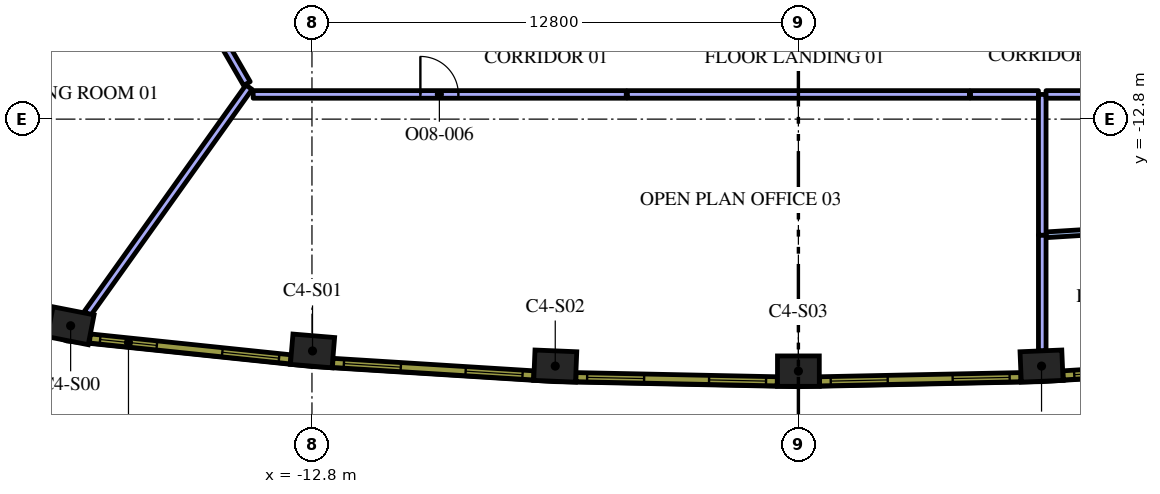
"""IFC4 building model, lengths in metres.
Left out: names, types, materials, properties, quantities, classifications, styles, units other than length and angle.
Written with IfcOpenShell. Run it as: python <this file> out.ifc"""

import sys

from ifc_helpers import new_model, si_unit, direction, frame, frame_2d, origin, origin_2d, place, context, subcontext, project, spatial, rectangle, extrude, element, fill, save


model = new_model("IFC4")
c1 = context("Model", 3, precision=1e-05, world=origin(), true_north=direction((0.0, 1.0)))
c2 = subcontext(c1, "Body", "Model", "MODEL_VIEW")
j1 = project(units=[si_unit("LENGTHUNIT", "METRE"), si_unit("PLANEANGLEUNIT", "RADIAN")], contexts=[c1])
p1 = place(None, origin())
s1 = spatial("IfcSite", under=j1, at=p1, CompositionType="ELEMENT")
p2 = place(p1, origin())
s2 = spatial("IfcBuilding", under=s1, at=p2, CompositionType="ELEMENT")
p3 = place(p2, frame((0.0, 0.0, 231.0)))
s3 = spatial("IfcBuildingStorey", under=s2, at=p3, CompositionType="ELEMENT", Elevation=231.0)
for number, where, z_axis, x_axis in (
    (1, (-19.15, -18.237, 0.0), (0.0, 0.0, 1.0), (0.981, -0.192, 0.0)),
    (2, (-12.785, -18.9, 0.0), (0.0, 0.0, 1.0), (0.997, -0.083, 0.0)),
    (3, (-6.398, -19.298, 0.0), (0.0, 0.0, 1.0), (0.999, -0.041, 0.0)),
    (4, (0.0, -19.431, 0.0), (0.0, 0.0, 1.0), (1.0, 0.0, 0.0)),
    (5, (6.398, -19.298, 0.0), (0.0, 0.0, 1.0), (0.999, 0.041, 0.0)),
):
    element("IfcColumn", number, at=place(p3, frame(where, z_axis=z_axis, x_axis=x_axis)), inside=s3, PredefinedType="COLUMN", context=c2, shape_type="SweptSolid", body=[
        extrude(rectangle(XDim=1.1, YDim=0.8, at=origin_2d()), origin(), (0.0, 0.0, 1.0), 4.2),
    ])
p4 = place(p3, frame((-14.457, -11.96, 0.0), z_axis=(0.0, 0.0, 1.0), x_axis=(-0.581023578026, -0.813886725397, 0.0)))
e6 = element("IfcWall", 6, at=p4, inside=s3, PredefinedType="PARTITIONING", context=c2, shape_type="SweptSolid", body=[
    extrude(rectangle(XDim=7.318, YDim=0.2, at=frame_2d((3.659, 0.0))), origin(), (0.0, 0.0, 1.0), 3.45),
])
p5 = place(p3, frame((-17.531, -6.635, 0.0), z_axis=(0.0, 0.0, 1.0), x_axis=(0.500009459589, -0.866019942219, 0.0)))
e7 = element("IfcWall", 7, at=p5, inside=s3, PredefinedType="PARTITIONING", context=c2, shape_type="SweptSolid", body=[
    extrude(rectangle(XDim=6.038, YDim=0.2, at=frame_2d((3.019, 0.0))), origin(), (0.0, 0.0, 1.0), 3.45),
])
p6 = place(p5, frame((2.5, 0.0, 0.0)))
e8 = element("IfcOpeningElement", 8, at=p6, cuts=e7, PredefinedType="OPENING", context=c2, shape_type="SweptSolid", body=[
    extrude(rectangle(XDim=1.0, YDim=2.1, at=frame_2d((0.5, 1.05))), frame((0.0, 0.11, 0.0), z_axis=(0.0, -1.0, 0.0), x_axis=(1.0, 0.0, 0.0)), (0.0, 0.0, 1.0), 0.22),
])
p7 = place(p3, frame((6.417, -15.846, 0.0), z_axis=(0.0, 0.0, 1.0), x_axis=(0.0, -1.0, 0.0)))
e9 = element("IfcWall", 9, at=p7, inside=s3, PredefinedType="PARTITIONING", context=c2, shape_type="SweptSolid", body=[
    extrude(rectangle(XDim=3.051, YDim=0.2, at=frame_2d((1.525, 0.0))), origin(), (0.0, 0.0, 1.0), 3.45),
])
p8 = place(p3, frame((6.417, -12.15, 0.0), z_axis=(0.0, 0.0, 1.0), x_axis=(0.0, -1.0, 0.0)))
e10 = element("IfcWall", 10, at=p8, inside=s3, PredefinedType="PARTITIONING", context=c2, shape_type="SweptSolid", body=[
    extrude(rectangle(XDim=3.704, YDim=0.2, at=frame_2d((1.852, 0.0))), origin(), (0.0, 0.0, 1.0), 3.45),
])
p9 = place(p3, frame((-4.5, -12.15, 0.0), z_axis=(0.0, 0.0, 1.0), x_axis=(1.0, 0.0, 0.0)))
e11 = element("IfcWall", 11, at=p9, inside=s3, PredefinedType="PARTITIONING", context=c2, shape_type="SweptSolid", body=[
    extrude(rectangle(XDim=9.0, YDim=0.2, at=frame_2d((4.5, 0.0))), origin(), (0.0, 0.0, 1.0), 3.45),
])
p10 = place(p3, frame((-14.347, -12.15, 0.0), z_axis=(0.0, 0.0, 1.0), x_axis=(1.0, 0.0, 0.0)))
e12 = element("IfcWall", 12, at=p10, inside=s3, PredefinedType="PARTITIONING", context=c2, shape_type="SweptSolid", body=[
    extrude(rectangle(XDim=9.817, YDim=0.2, at=frame_2d((4.909, 0.0))), origin(), (0.0, 0.0, 1.0), 3.45),
])
p11 = place(p10, frame((4.4, 0.0, 0.0)))
e13 = element("IfcOpeningElement", 13, at=p11, cuts=e12, PredefinedType="OPENING", context=c2, shape_type="SweptSolid", body=[
    extrude(rectangle(XDim=1.0, YDim=2.1, at=frame_2d((0.5, 1.05))), frame((0.0, 0.11, 0.0), z_axis=(0.0, -1.0, 0.0), x_axis=(1.0, 0.0, 0.0)), (0.0, 0.0, 1.0), 0.22),
])
p12 = place(p3, frame((4.53, -12.15, 0.0), z_axis=(0.0, 0.0, 1.0), x_axis=(1.0, 0.0, 0.0)))
e14 = element("IfcWall", 14, at=p12, inside=s3, PredefinedType="PARTITIONING", context=c2, shape_type="SweptSolid", body=[
    extrude(rectangle(XDim=1.787, YDim=0.2, at=frame_2d((0.894, 0.0))), origin(), (0.0, 0.0, 1.0), 3.45),
])
p13 = place(p3, frame((12.5, -15.471, 0.0), z_axis=(0.0, 0.0, 1.0), x_axis=(-0.998061916726, -0.0622286942, 0.0)))
e15 = element("IfcWall", 15, at=p13, inside=s3, PredefinedType="PARTITIONING", context=c2, shape_type="SweptSolid", body=[
    extrude(rectangle(XDim=5.995, YDim=0.15, at=frame_2d((2.998, 0.0))), origin(), (0.0, 0.0, 1.0), 3.45),
])
p14 = place(p13, frame((2.595, 0.0, 0.0)))
e16 = element("IfcOpeningElement", 16, at=p14, cuts=e15, PredefinedType="OPENING", context=c2, shape_type="SweptSolid", body=[
    extrude(rectangle(XDim=0.9, YDim=2.1, at=frame_2d((0.45, 1.05))), frame((0.0, 0.085, 0.0), z_axis=(0.0, -1.0, 0.0), x_axis=(1.0, 0.0, 0.0)), (0.0, 0.0, 1.0), 0.17),
])
p15 = place(p3, frame((6.517, -12.15, 0.0), z_axis=(0.0, 0.0, 1.0), x_axis=(1.0, 0.0, 0.0)))
e17 = element("IfcWall", 17, at=p15, inside=s3, PredefinedType="PARTITIONING", context=c2, shape_type="SweptSolid", body=[
    extrude(rectangle(XDim=7.83, YDim=0.2, at=frame_2d((3.915, 0.0))), origin(), (0.0, 0.0, 1.0), 3.45),
])
p16 = place(p15, frame((3.4, 0.0, 0.0)))
e18 = element("IfcOpeningElement", 18, at=p16, cuts=e17, PredefinedType="OPENING", context=c2, shape_type="SweptSolid", body=[
    extrude(rectangle(XDim=1.0, YDim=2.1, at=frame_2d((0.5, 1.05))), frame((0.0, 0.11, 0.0), z_axis=(0.0, -1.0, 0.0), x_axis=(1.0, 0.0, 0.0)), (0.0, 0.0, 1.0), 0.22),
])
p17 = place(p3, frame((-18.644, -18.571, 0.0), z_axis=(0.0, 0.0, 1.0), x_axis=(0.994621961215, -0.103571976272, 0.0)))
e19 = element("IfcWall", 19, at=p17, inside=s3, PredefinedType="SOLIDWALL", context=c2, shape_type="SweptSolid", body=[
    extrude(rectangle(XDim=5.311, YDim=0.24, at=frame_2d((2.655, 0.0))), origin(), (0.0, 0.0, 1.0), 3.95),
])
p18 = place(p17, frame((0.271, 0.0, 0.9)))
e20 = element("IfcOpeningElement", 20, at=p18, cuts=e19, PredefinedType="OPENING", context=c2, shape_type="SweptSolid", body=[
    extrude(rectangle(XDim=1.5, YDim=2.55, at=frame_2d((0.75, 1.275))), frame((0.0, 0.13, 0.0), z_axis=(0.0, -1.0, 0.0), x_axis=(1.0, 0.0, 0.0)), (0.0, 0.0, 1.0), 0.26),
])
p19 = place(p17, frame((3.504, 0.0, 0.9)))
e21 = element("IfcOpeningElement", 21, at=p19, cuts=e19, PredefinedType="OPENING", context=c2, shape_type="SweptSolid", body=[
    extrude(rectangle(XDim=1.5, YDim=2.55, at=frame_2d((0.75, 1.275))), frame((0.0, 0.13, 0.0), z_axis=(0.0, -1.0, 0.0), x_axis=(1.0, 0.0, 0.0)), (0.0, 0.0, 1.0), 0.26),
])
p20 = place(p3, frame((-12.253, -19.213, 0.0), z_axis=(0.0, 0.0, 1.0), x_axis=(0.9980633213, -0.062206162685, 0.0)))
e22 = element("IfcWall", 22, at=p20, inside=s3, PredefinedType="SOLIDWALL", context=c2, shape_type="SweptSolid", body=[
    extrude(rectangle(XDim=5.298, YDim=0.24, at=frame_2d((2.649, 0.0))), origin(), (0.0, 0.0, 1.0), 3.95),
])
p21 = place(p20, frame((0.294, 0.0, 0.9)))
e23 = element("IfcOpeningElement", 23, at=p21, cuts=e22, PredefinedType="OPENING", context=c2, shape_type="SweptSolid", body=[
    extrude(rectangle(XDim=1.5, YDim=2.55, at=frame_2d((0.75, 1.275))), frame((0.0, 0.13, 0.0), z_axis=(0.0, -1.0, 0.0), x_axis=(1.0, 0.0, 0.0)), (0.0, 0.0, 1.0), 0.26),
])
p22 = place(p20, frame((3.504, 0.0, 0.9)))
e24 = element("IfcOpeningElement", 24, at=p22, cuts=e22, PredefinedType="OPENING", context=c2, shape_type="SweptSolid", body=[
    extrude(rectangle(XDim=1.5, YDim=2.55, at=frame_2d((0.75, 1.275))), frame((0.0, 0.13, 0.0), z_axis=(0.0, -1.0, 0.0), x_axis=(1.0, 0.0, 0.0)), (0.0, 0.0, 1.0), 0.26),
])
p23 = place(p3, frame((-5.854, -19.589, 0.0), z_axis=(0.0, 0.0, 1.0), x_axis=(0.999784035184, -0.020781794712, 0.0)))
e25 = element("IfcWall", 25, at=p23, inside=s3, PredefinedType="SOLIDWALL", context=c2, shape_type="SweptSolid", body=[
    extrude(rectangle(XDim=5.298, YDim=0.24, at=frame_2d((2.649, 0.0))), origin(), (0.0, 0.0, 1.0), 3.95),
])
p24 = place(p23, frame((0.294, 0.0, 0.9)))
e26 = element("IfcOpeningElement", 26, at=p24, cuts=e25, PredefinedType="OPENING", context=c2, shape_type="SweptSolid", body=[
    extrude(rectangle(XDim=1.5, YDim=2.55, at=frame_2d((0.75, 1.275))), frame((0.0, 0.13, 0.0), z_axis=(0.0, -1.0, 0.0), x_axis=(1.0, 0.0, 0.0)), (0.0, 0.0, 1.0), 0.26),
])
p25 = place(p23, frame((3.504, 0.0, 0.9)))
e27 = element("IfcOpeningElement", 27, at=p25, cuts=e25, PredefinedType="OPENING", context=c2, shape_type="SweptSolid", body=[
    extrude(rectangle(XDim=1.5, YDim=2.55, at=frame_2d((0.75, 1.275))), frame((0.0, 0.13, 0.0), z_axis=(0.0, -1.0, 0.0), x_axis=(1.0, 0.0, 0.0)), (0.0, 0.0, 1.0), 0.26),
])
p26 = place(p3, frame((0.556, -19.699, 0.0), z_axis=(0.0, 0.0, 1.0), x_axis=(0.999784035184, 0.020781794712, 0.0)))
e28 = element("IfcWall", 28, at=p26, inside=s3, PredefinedType="SOLIDWALL", context=c2, shape_type="SweptSolid", body=[
    extrude(rectangle(XDim=5.298, YDim=0.24, at=frame_2d((2.649, 0.0))), origin(), (0.0, 0.0, 1.0), 3.95),
])
p27 = place(p26, frame((0.294, 0.0, 0.9)))
e29 = element("IfcOpeningElement", 29, at=p27, cuts=e28, PredefinedType="OPENING", context=c2, shape_type="SweptSolid", body=[
    extrude(rectangle(XDim=1.5, YDim=2.55, at=frame_2d((0.75, 1.275))), frame((0.0, 0.13, 0.0), z_axis=(0.0, -1.0, 0.0), x_axis=(1.0, 0.0, 0.0)), (0.0, 0.0, 1.0), 0.26),
])
p28 = place(p26, frame((3.504, 0.0, 0.9)))
e30 = element("IfcOpeningElement", 30, at=p28, cuts=e28, PredefinedType="OPENING", context=c2, shape_type="SweptSolid", body=[
    extrude(rectangle(XDim=1.5, YDim=2.55, at=frame_2d((0.75, 1.275))), frame((0.0, 0.13, 0.0), z_axis=(0.0, -1.0, 0.0), x_axis=(1.0, 0.0, 0.0)), (0.0, 0.0, 1.0), 0.26),
])
p29 = place(p3, frame((6.965, -19.543, 0.0), z_axis=(0.0, 0.0, 1.0), x_axis=(0.9980633213, 0.062206162685, 0.0)))
e31 = element("IfcWall", 31, at=p29, inside=s3, PredefinedType="SOLIDWALL", context=c2, shape_type="SweptSolid", body=[
    extrude(rectangle(XDim=5.298, YDim=0.24, at=frame_2d((2.649, 0.0))), origin(), (0.0, 0.0, 1.0), 3.95),
])
p30 = place(p29, frame((0.295, 0.0, 0.9)))
e32 = element("IfcOpeningElement", 32, at=p30, cuts=e31, PredefinedType="OPENING", context=c2, shape_type="SweptSolid", body=[
    extrude(rectangle(XDim=1.5, YDim=2.55, at=frame_2d((0.75, 1.275))), frame((0.0, 0.13, 0.0), z_axis=(0.0, -1.0, 0.0), x_axis=(1.0, 0.0, 0.0)), (0.0, 0.0, 1.0), 0.26),
])
p31 = place(p29, frame((3.504, 0.0, 0.9)))
e33 = element("IfcOpeningElement", 33, at=p31, cuts=e31, PredefinedType="OPENING", context=c2, shape_type="SweptSolid", body=[
    extrude(rectangle(XDim=1.5, YDim=2.55, at=frame_2d((0.75, 1.275))), frame((0.0, 0.13, 0.0), z_axis=(0.0, -1.0, 0.0), x_axis=(1.0, 0.0, 0.0)), (0.0, 0.0, 1.0), 0.26),
])
p32 = place(p11, origin())
e34 = element("IfcDoor", 34, at=p32, inside=s3, OperationType="SINGLE_SWING_LEFT", PredefinedType="DOOR", context=c2, shape_type="SweptSolid", body=[
    extrude(rectangle(XDim=1.0, YDim=2.1, at=frame_2d((0.5, 1.05))), frame((0.0, 0.025, 0.0), z_axis=(0.0, -1.0, 0.0), x_axis=(1.0, 0.0, 0.0)), (0.0, 0.0, 1.0), 0.05),
])
fill(e13, e34)
p33 = place(p18, origin())
e35 = element("IfcWindow", 35, at=p33, inside=s3, PartitioningType="SINGLE_PANEL", PredefinedType="WINDOW", context=c2, shape_type="SweptSolid", body=[
    extrude(rectangle(XDim=1.5, YDim=2.55, at=frame_2d((0.75, 1.275))), frame((0.0, 0.04, 0.0), z_axis=(0.0, -1.0, 0.0), x_axis=(1.0, 0.0, 0.0)), (0.0, 0.0, 1.0), 0.06),
])
fill(e20, e35)
p34 = place(p19, origin())
e36 = element("IfcWindow", 36, at=p34, inside=s3, PartitioningType="SINGLE_PANEL", PredefinedType="WINDOW", context=c2, shape_type="SweptSolid", body=[
    extrude(rectangle(XDim=1.5, YDim=2.55, at=frame_2d((0.75, 1.275))), frame((0.0, 0.04, 0.0), z_axis=(0.0, -1.0, 0.0), x_axis=(1.0, 0.0, 0.0)), (0.0, 0.0, 1.0), 0.06),
])
fill(e21, e36)
p35 = place(p21, origin())
e37 = element("IfcWindow", 37, at=p35, inside=s3, PartitioningType="SINGLE_PANEL", PredefinedType="WINDOW", context=c2, shape_type="SweptSolid", body=[
    extrude(rectangle(XDim=1.5, YDim=2.55, at=frame_2d((0.75, 1.275))), frame((0.0, 0.04, 0.0), z_axis=(0.0, -1.0, 0.0), x_axis=(1.0, 0.0, 0.0)), (0.0, 0.0, 1.0), 0.06),
])
fill(e23, e37)
p36 = place(p22, origin())
e38 = element("IfcWindow", 38, at=p36, inside=s3, PartitioningType="SINGLE_PANEL", PredefinedType="WINDOW", context=c2, shape_type="SweptSolid", body=[
    extrude(rectangle(XDim=1.5, YDim=2.55, at=frame_2d((0.75, 1.275))), frame((0.0, 0.04, 0.0), z_axis=(0.0, -1.0, 0.0), x_axis=(1.0, 0.0, 0.0)), (0.0, 0.0, 1.0), 0.06),
])
fill(e24, e38)
p37 = place(p24, origin())
e39 = element("IfcWindow", 39, at=p37, inside=s3, PartitioningType="SINGLE_PANEL", PredefinedType="WINDOW", context=c2, shape_type="SweptSolid", body=[
    extrude(rectangle(XDim=1.5, YDim=2.55, at=frame_2d((0.75, 1.275))), frame((0.0, 0.04, 0.0), z_axis=(0.0, -1.0, 0.0), x_axis=(1.0, 0.0, 0.0)), (0.0, 0.0, 1.0), 0.06),
])
fill(e26, e39)
p38 = place(p25, origin())
e40 = element("IfcWindow", 40, at=p38, inside=s3, PartitioningType="SINGLE_PANEL", PredefinedType="WINDOW", context=c2, shape_type="SweptSolid", body=[
    extrude(rectangle(XDim=1.5, YDim=2.55, at=frame_2d((0.75, 1.275))), frame((0.0, 0.04, 0.0), z_axis=(0.0, -1.0, 0.0), x_axis=(1.0, 0.0, 0.0)), (0.0, 0.0, 1.0), 0.06),
])
fill(e27, e40)
p39 = place(p27, origin())
e41 = element("IfcWindow", 41, at=p39, inside=s3, PartitioningType="SINGLE_PANEL", PredefinedType="WINDOW", context=c2, shape_type="SweptSolid", body=[
    extrude(rectangle(XDim=1.5, YDim=2.55, at=frame_2d((0.75, 1.275))), frame((0.0, 0.04, 0.0), z_axis=(0.0, -1.0, 0.0), x_axis=(1.0, 0.0, 0.0)), (0.0, 0.0, 1.0), 0.06),
])
fill(e29, e41)
p40 = place(p28, origin())
e42 = element("IfcWindow", 42, at=p40, inside=s3, PartitioningType="SINGLE_PANEL", PredefinedType="WINDOW", context=c2, shape_type="SweptSolid", body=[
    extrude(rectangle(XDim=1.5, YDim=2.55, at=frame_2d((0.75, 1.275))), frame((0.0, 0.04, 0.0), z_axis=(0.0, -1.0, 0.0), x_axis=(1.0, 0.0, 0.0)), (0.0, 0.0, 1.0), 0.06),
])
fill(e30, e42)
p41 = place(p30, origin())
e43 = element("IfcWindow", 43, at=p41, inside=s3, PartitioningType="SINGLE_PANEL", PredefinedType="WINDOW", context=c2, shape_type="SweptSolid", body=[
    extrude(rectangle(XDim=1.5, YDim=2.55, at=frame_2d((0.75, 1.275))), frame((0.0, 0.04, 0.0), z_axis=(0.0, -1.0, 0.0), x_axis=(1.0, 0.0, 0.0)), (0.0, 0.0, 1.0), 0.06),
])
fill(e32, e43)
save(model, sys.argv[1])
